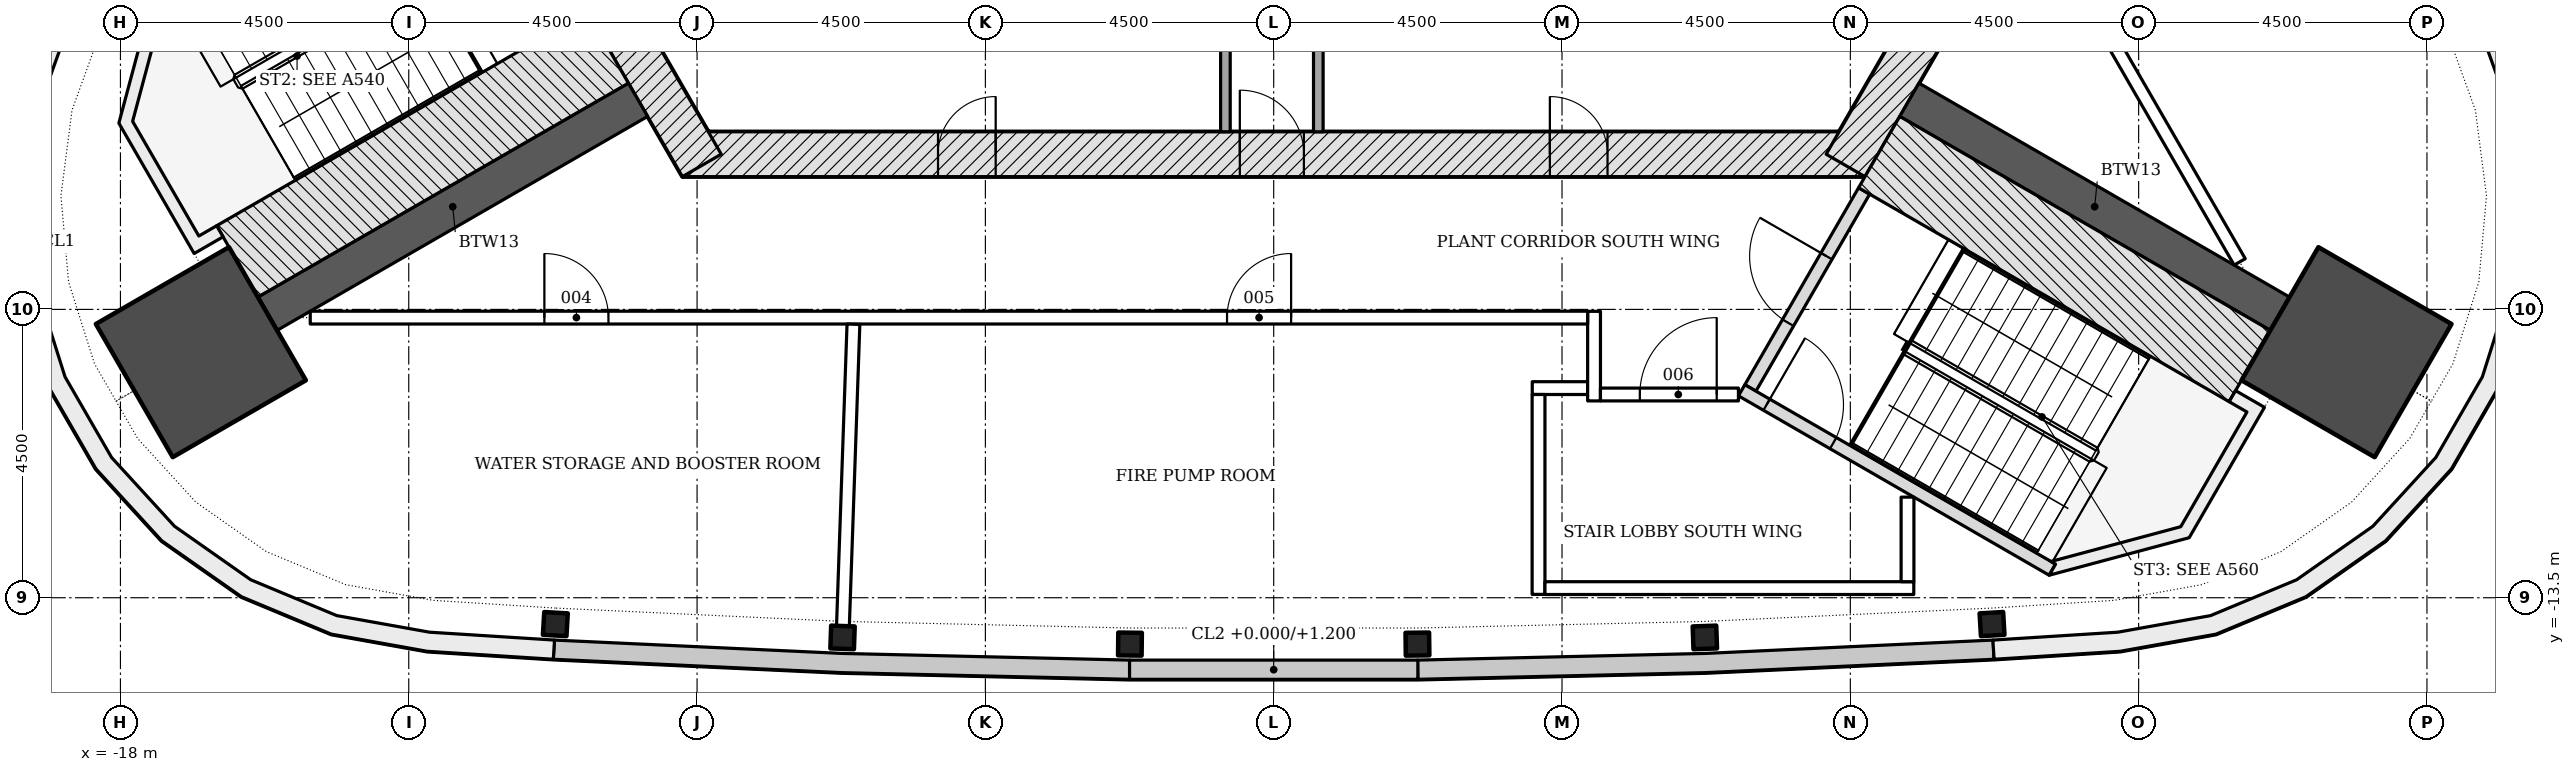
"""IFC4 building model, lengths in metres.
Left out: names, types, materials, properties, quantities, classifications, styles, units other than length and angle.
Written with IfcOpenShell. Run it as: python <this file> out.ifc"""

import sys

from ifc_helpers import new_model, si_unit, direction, frame, frame_2d, origin, origin_2d, place, context, subcontext, project, spatial, polyline, rectangle, i_section, outline, extrude, element, fill, save


model = new_model("IFC4")
c1 = context("Model", 3, precision=1e-05, world=origin(), true_north=direction((0.0, 1.0)))
c2 = subcontext(c1, "Body", "Model", "MODEL_VIEW")
j1 = project(units=[si_unit("LENGTHUNIT", "METRE"), si_unit("PLANEANGLEUNIT", "RADIAN")], contexts=[c1])
p1 = place(None, origin())
s1 = spatial("IfcSite", under=j1, at=p1, CompositionType="ELEMENT")
p2 = place(p1, origin())
s2 = spatial("IfcBuilding", under=s1, at=p2, CompositionType="ELEMENT")
p3 = place(p2, frame((0.0, 0.0, 297.6)))
s3 = spatial("IfcBuildingStorey", under=s2, at=p3, CompositionType="ELEMENT", Elevation=297.6)
p4 = place(p3, frame((-9.229, -6.578, -0.25), z_axis=(0.0, 0.0, 1.0), x_axis=(1.0, 0.0, 0.0)))
e1 = element("IfcWall", 1, at=p4, inside=s3, PredefinedType="SHEAR", context=c2, shape_type="SweptSolid", body=[
    extrude(rectangle(XDim=18.458, YDim=0.7, at=frame_2d((9.229, 0.0))), origin(), (0.0, 0.0, 1.0), 4.5),
])
p5 = place(p4, frame((8.7, 0.0, 0.25)))
e2 = element("IfcOpeningElement", 2, at=p5, cuts=e1, PredefinedType="OPENING", context=c2, shape_type="SweptSolid", body=[
    extrude(rectangle(XDim=1.0, YDim=2.1, at=frame_2d((0.5, 1.05))), frame((0.0, 0.36, 0.0), z_axis=(0.0, -1.0, 0.0), x_axis=(1.0, 0.0, 0.0)), (0.0, 0.0, 1.0), 0.72),
])
p6 = place(p4, frame((3.99, 0.0, 0.25)))
e3 = element("IfcOpeningElement", 3, at=p6, cuts=e1, PredefinedType="OPENING", context=c2, shape_type="SweptSolid", body=[
    extrude(rectangle(XDim=0.9, YDim=2.1, at=frame_2d((0.45, 1.05))), frame((0.0, 0.36, 0.0), z_axis=(0.0, -1.0, 0.0), x_axis=(1.0, 0.0, 0.0)), (0.0, 0.0, 1.0), 0.72),
])
p7 = place(p4, frame((13.539, 0.0, 0.25)))
e4 = element("IfcOpeningElement", 4, at=p7, cuts=e1, PredefinedType="OPENING", context=c2, shape_type="SweptSolid", body=[
    extrude(rectangle(XDim=0.9, YDim=2.1, at=frame_2d((0.45, 1.05))), frame((0.0, 0.36, 0.0), z_axis=(0.0, -1.0, 0.0), x_axis=(1.0, 0.0, 0.0)), (0.0, 0.0, 1.0), 0.72),
])
for number, where, z_axis, x_axis in (
    (5, (8.926, -6.753, -0.25), (0.0, 0.0, 1.0), (0.5, 0.866, 0.0)),
    (6, (-10.311, -4.353, -0.25), (0.0, 0.0, 1.0), (0.5, -0.866, 0.0)),
):
    element("IfcWall", number, at=place(p3, frame(where, z_axis=z_axis, x_axis=x_axis)), inside=s3, PredefinedType="SHEAR", context=c2, shape_type="SweptSolid", body=[
        extrude(rectangle(XDim=2.771, YDim=0.7, at=frame_2d((1.386, 0.0))), origin(), (0.0, 0.0, 1.0), 4.5),
    ])
for number, where, z_axis, x_axis in (
    (7, (-9.922, -5.728, -0.25), (0.0, 0.0, 1.0), (-0.866, -0.5, 0.0)),
    (8, (9.922, -5.728, -0.25), (0.0, 0.0, 1.0), (0.866, -0.5, 0.0)),
):
    element("IfcWall", number, at=place(p3, frame(where, z_axis=z_axis, x_axis=x_axis)), inside=s3, PredefinedType="SHEAR", context=c2, shape_type="SweptSolid", body=[
        extrude(rectangle(XDim=6.678, YDim=0.6, at=frame_2d((3.339, 0.0))), origin(), (0.0, 0.0, 1.0), 4.5),
    ])
for number, where, z_axis, x_axis in (
    (9, (-16.745, -9.667, -0.25), (0.0, 0.0, 1.0), (-0.866, -0.5, 0.0)),
    (10, (16.745, -9.667, -0.25), (0.0, 0.0, 1.0), (0.866, -0.5, 0.0)),
):
    element("IfcColumn", number, at=place(p3, frame(where, z_axis=z_axis, x_axis=x_axis)), inside=s3, PredefinedType="COLUMN", context=c2, shape_type="SweptSolid", body=[
        extrude(rectangle(XDim=2.4, YDim=2.4, at=origin_2d()), origin(), (0.0, 0.0, 1.0), 4.5),
    ])
for number, where, z_axis, x_axis in (
    (11, (-11.212, -13.911, -0.25), (0.0, 0.0, 1.0), (0.998, -0.058, 0.0)),
    (12, (-6.729, -14.119, -0.25), (0.0, 0.0, 1.0), (0.999, -0.035, 0.0)),
    (13, (-2.244, -14.224, -0.25), (0.0, 0.0, 1.0), (1.0, -0.012, 0.0)),
    (14, (2.244, -14.224, -0.25), (0.0, 0.0, 1.0), (1.0, 0.012, 0.0)),
    (15, (6.729, -14.119, -0.25), (0.0, 0.0, 1.0), (0.999, 0.035, 0.0)),
    (16, (11.212, -13.911, -0.25), (0.0, 0.0, 1.0), (0.998, 0.058, 0.0)),
):
    element("IfcColumn", number, at=place(p3, frame(where, z_axis=z_axis, x_axis=x_axis)), inside=s3, PredefinedType="COLUMN", context=c2, shape_type="SweptSolid", body=[
        extrude(i_section(OverallWidth=0.368, OverallDepth=0.356, WebThickness=0.011, FlangeThickness=0.018, FilletRadius=0.015, at=origin_2d()), origin(), (0.0, 0.0, 1.0), 4.5),
    ])
p8 = place(p3, origin())
e17 = element("IfcWall", 17, at=p8, inside=s3, PredefinedType="NOTDEFINED", context=c2, shape_type="SweptSolid", body=[
    extrude(outline(polyline([(-11.244, -14.46), (-6.749, -14.669), (-2.25, -14.773), (-2.243, -14.474), (-6.738, -14.369), (-11.23, -14.161), (-11.244, -14.46)])), origin(), (0.0, 0.0, 1.0), 4.25),
])
p9 = place(p3, origin())
e18 = element("IfcWall", 18, at=p9, inside=s3, PredefinedType="NOTDEFINED", context=c2, shape_type="SweptSolid", body=[
    extrude(outline(polyline([(2.25, -14.773), (6.749, -14.669), (11.244, -14.46), (11.23, -14.161), (6.738, -14.369), (2.243, -14.474), (2.25, -14.773)])), origin(), (0.0, 0.0, 1.0), 4.25),
])
p10 = place(p3, origin())
e19 = element("IfcWall", 19, at=p10, inside=s3, PredefinedType="NOTDEFINED", context=c2, shape_type="SweptSolid", body=[
    extrude(outline(polyline([(-2.25, -14.773), (2.25, -14.773), (2.25, -14.473), (-2.25, -14.473), (-2.25, -14.773)])), origin(), (0.0, 0.0, 1.0), 1.2),
])
p11 = place(p3, origin())
e20 = element("IfcWall", 20, at=p11, inside=s3, PredefinedType="NOTDEFINED", context=c2, shape_type="SweptSolid", body=[
    extrude(outline(polyline([(-18.145, -2.507), (-19.021, -4.273), (-19.538, -5.703), (-19.733, -7.21), (-19.599, -8.724), (-19.141, -10.174), (-18.381, -11.49), (-17.355, -12.611), (-16.111, -13.485), (-14.708, -14.069), (-13.211, -14.336), (-11.244, -14.46), (-11.225, -14.161), (-13.176, -14.038), (-14.623, -13.779), (-15.965, -13.22), (-17.156, -12.385), (-18.138, -11.312), (-18.865, -10.052), (-19.303, -8.665), (-19.432, -7.216), (-19.244, -5.774), (-18.745, -4.391), (-17.876, -2.64), (-18.145, -2.507)])), origin(), (0.0, 0.0, 1.0), 4.25),
])
p12 = place(p3, origin())
e21 = element("IfcWall", 21, at=p12, inside=s3, PredefinedType="NOTDEFINED", context=c2, shape_type="SweptSolid", body=[
    extrude(outline(polyline([(11.244, -14.46), (13.211, -14.336), (14.708, -14.069), (16.111, -13.485), (17.355, -12.611), (18.381, -11.49), (19.141, -10.174), (19.599, -8.724), (19.733, -7.21), (19.538, -5.703), (19.021, -4.273), (18.145, -2.507), (17.876, -2.64), (18.745, -4.391), (19.244, -5.774), (19.432, -7.216), (19.303, -8.665), (18.865, -10.052), (18.138, -11.312), (17.156, -12.385), (15.965, -13.22), (14.623, -13.779), (13.176, -14.038), (11.225, -14.161), (11.244, -14.46)])), origin(), (0.0, 0.0, 1.0), 4.25),
])
p13 = place(p3, frame((-0.754, 10.756, 0.0), z_axis=(0.0, 0.0, 1.0), x_axis=(0.0, -1.0, 0.0)))
e22 = element("IfcWall", 22, at=p13, inside=s3, PredefinedType="PARTITIONING", context=c2, shape_type="SweptSolid", body=[
    extrude(rectangle(XDim=16.985, YDim=0.15, at=frame_2d((8.492, 0.0))), origin(), (0.0, 0.0, 1.0), 4.25),
])
p14 = place(p13, frame((9.185, 0.0, 0.0)))
e23 = element("IfcOpeningElement", 23, at=p14, cuts=e22, PredefinedType="OPENING", context=c2, shape_type="SweptSolid", body=[
    extrude(rectangle(XDim=0.9, YDim=2.1, at=frame_2d((0.45, 1.05))), frame((0.0, 0.085, 0.0), z_axis=(0.0, -1.0, 0.0), x_axis=(1.0, 0.0, 0.0)), (0.0, 0.0, 1.0), 0.17),
])
p15 = place(p3, frame((0.696, 5.197, 0.0), z_axis=(0.0, 0.0, 1.0), x_axis=(0.0, -1.0, 0.0)))
e24 = element("IfcWall", 24, at=p15, inside=s3, PredefinedType="PARTITIONING", context=c2, shape_type="SweptSolid", body=[
    extrude(rectangle(XDim=11.425, YDim=0.15, at=frame_2d((5.712, 0.0))), origin(), (0.0, 0.0, 1.0), 4.25),
])
p16 = place(p15, frame((3.664, 0.0, 0.0)))
e25 = element("IfcOpeningElement", 25, at=p16, cuts=e24, PredefinedType="OPENING", context=c2, shape_type="SweptSolid", body=[
    extrude(rectangle(XDim=0.9, YDim=2.1, at=frame_2d((0.45, 1.05))), frame((0.0, 0.085, 0.0), z_axis=(0.0, -1.0, 0.0), x_axis=(1.0, 0.0, 0.0)), (0.0, 0.0, 1.0), 0.17),
])
p17 = place(p3, frame((-10.393, -4.912, -0.25), z_axis=(0.0, 0.0, 1.0), x_axis=(-0.866025486527, -0.499999856685, 0.0)))
e26 = element("IfcWall", 26, at=p17, inside=s3, PredefinedType="SHEAR", context=c2, shape_type="SweptSolid", body=[
    extrude(rectangle(XDim=6.679, YDim=1.286, at=frame_2d((3.339, 0.0))), origin(), (0.0, 0.0, 1.0), 4.5),
])
p18 = place(p3, frame((0.0, 0.0, -0.25)))
e27 = element("IfcWall", 27, at=p18, inside=s3, PredefinedType="SHEAR", context=c2, shape_type="SweptSolid", body=[
    extrude(outline(polyline([(-17.439, -3.907), (-18.025, -6.093), (-16.85, -8.128), (-16.398, -7.867), (-16.498, -7.694), (-16.498, -7.694), (-16.777, -7.855), (-17.81, -6.065), (-17.267, -4.039), (-17.339, -4.081), (-17.339, -4.081), (-17.339, -4.081), (-17.339, -4.081), (-17.339, -4.081), (-17.339, -4.081), (-17.339, -4.081), (-17.339, -4.081), (-17.339, -4.081), (-17.339, -4.081), (-17.339, -4.081), (-17.339, -4.081), (-17.339, -4.081), (-17.339, -4.081), (-17.339, -4.081), (-17.339, -4.081), (-17.339, -4.081), (-17.439, -3.907)])), origin(), (0.0, 0.0, 1.0), 4.5),
])
p19 = place(p3, frame((7.44, -10.226, -0.25), z_axis=(0.0, 0.0, 1.0), x_axis=(0.500022077904, 0.866012656725, 0.0)))
e28 = element("IfcWall", 28, at=p19, inside=s3, PredefinedType="SHEAR", context=c2, shape_type="SweptSolid", body=[
    extrude(rectangle(XDim=3.55, YDim=0.2, at=frame_2d((1.775, 0.0))), origin(), (0.0, 0.0, 1.0), 4.5),
])
p20 = place(p19, frame((1.175, 0.0, 0.25)))
e29 = element("IfcOpeningElement", 29, at=p20, cuts=e28, PredefinedType="OPENING", context=c2, shape_type="SweptSolid", body=[
    extrude(rectangle(XDim=1.2, YDim=2.1, at=frame_2d((0.6, 1.05))), frame((0.0, 0.11, 0.0), z_axis=(0.0, -1.0, 0.0), x_axis=(1.0, 0.0, 0.0)), (0.0, 0.0, 1.0), 0.22),
])
p21 = place(p3, frame((7.304, -10.262, -0.25), z_axis=(0.0, 0.0, 1.0), x_axis=(0.866026594901, -0.49999793692, 0.0)))
e30 = element("IfcWall", 30, at=p21, inside=s3, PredefinedType="SHEAR", context=c2, shape_type="SweptSolid", body=[
    extrude(rectangle(XDim=5.6, YDim=0.2, at=frame_2d((2.8, 0.0))), origin(), (0.0, 0.0, 1.0), 4.5),
])
p22 = place(p21, frame((0.45, 0.0, 0.25)))
e31 = element("IfcOpeningElement", 31, at=p22, cuts=e30, PredefinedType="OPENING", context=c2, shape_type="SweptSolid", body=[
    extrude(rectangle(XDim=1.2, YDim=2.1, at=frame_2d((0.6, 1.05))), frame((0.0, 0.11, 0.0), z_axis=(0.0, -1.0, 0.0), x_axis=(1.0, 0.0, 0.0)), (0.0, 0.0, 1.0), 0.22),
])
p23 = place(p3, frame((9.45, -6.545, -0.25), z_axis=(0.0, 0.0, 1.0), x_axis=(0.866016347338, -0.500015685897, 0.0)))
e32 = element("IfcWall", 32, at=p23, inside=s3, PredefinedType="SHEAR", context=c2, shape_type="SweptSolid", body=[
    extrude(rectangle(XDim=6.678, YDim=1.286, at=frame_2d((3.339, 0.0))), origin(), (0.0, 0.0, 1.0), 4.5),
])
p24 = place(p3, frame((0.0, 0.0, -0.25)))
e33 = element("IfcWall", 33, at=p24, inside=s3, PredefinedType="SHEAR", context=c2, shape_type="SweptSolid", body=[
    extrude(outline(polyline([(12.104, -13.149), (14.289, -12.563), (15.464, -10.528), (15.013, -10.268), (14.913, -10.441), (15.191, -10.601), (14.157, -12.392), (12.132, -12.934), (12.204, -12.976), (12.204, -12.976), (12.204, -12.976), (12.204, -12.976), (12.204, -12.976), (12.204, -12.976), (12.204, -12.976), (12.204, -12.976), (12.204, -12.976), (12.204, -12.976), (12.204, -12.976), (12.204, -12.976), (12.204, -12.976), (12.204, -12.976), (12.204, -12.976), (12.204, -12.976), (12.204, -12.976), (12.104, -13.149)])), origin(), (0.0, 0.0, 1.0), 4.5),
])
p25 = place(p3, frame((4.036, -10.228, 0.0), z_axis=(0.0, 0.0, 1.0), x_axis=(1.0, 0.0, 0.0)))
e34 = element("IfcWall", 34, at=p25, inside=s3, PredefinedType="PARTITIONING", context=c2, shape_type="SweptSolid", body=[
    extrude(rectangle(XDim=0.864, YDim=0.2, at=frame_2d((0.432, 0.0))), origin(), (0.0, 0.0, 1.0), 4.25),
])
p26 = place(p3, frame((5.0, -10.428, 0.0), z_axis=(0.0, 0.0, 1.0), x_axis=(0.0, 1.0, 0.0)))
e35 = element("IfcWall", 35, at=p26, inside=s3, PredefinedType="PARTITIONING", context=c2, shape_type="SweptSolid", body=[
    extrude(rectangle(XDim=1.398, YDim=0.2, at=frame_2d((0.699, 0.0))), origin(), (0.0, 0.0, 1.0), 4.25),
])
p27 = place(p3, frame((5.1, -10.328, 0.0), z_axis=(0.0, 0.0, 1.0), x_axis=(1.0, 0.0, 0.0)))
e36 = element("IfcWall", 36, at=p27, inside=s3, PredefinedType="PARTITIONING", context=c2, shape_type="SweptSolid", body=[
    extrude(rectangle(XDim=2.154, YDim=0.2, at=frame_2d((1.077, 0.0))), origin(), (0.0, 0.0, 1.0), 3.702),
])
p28 = place(p27, frame((0.615, 0.0, 0.0)))
e37 = element("IfcOpeningElement", 37, at=p28, cuts=e36, PredefinedType="OPENING", context=c2, shape_type="SweptSolid", body=[
    extrude(rectangle(XDim=1.2, YDim=2.1, at=frame_2d((0.6, 1.05))), frame((0.0, 0.11, 0.0), z_axis=(0.0, -1.0, 0.0), x_axis=(1.0, 0.0, 0.0)), (0.0, 0.0, 1.0), 0.22),
])
p29 = place(p3, frame((-15.037, -9.128, 0.0), z_axis=(0.0, 0.0, 1.0), x_axis=(1.0, 0.0, 0.0)))
e38 = element("IfcWall", 38, at=p29, inside=s3, PredefinedType="PARTITIONING", context=c2, shape_type="SweptSolid", body=[
    extrude(rectangle(XDim=19.937, YDim=0.2, at=frame_2d((9.969, 0.0))), origin(), (0.0, 0.0, 1.0), 3.702),
])
p30 = place(p29, frame((3.654, 0.0, 0.0)))
e39 = element("IfcOpeningElement", 39, at=p30, cuts=e38, PredefinedType="OPENING", context=c2, shape_type="SweptSolid", body=[
    extrude(rectangle(XDim=1.0, YDim=2.1, at=frame_2d((0.5, 1.05))), frame((0.0, 0.11, 0.0), z_axis=(0.0, -1.0, 0.0), x_axis=(1.0, 0.0, 0.0)), (0.0, 0.0, 1.0), 0.22),
])
p31 = place(p29, frame((14.309, 0.0, 0.0)))
e40 = element("IfcOpeningElement", 40, at=p31, cuts=e38, PredefinedType="OPENING", context=c2, shape_type="SweptSolid", body=[
    extrude(rectangle(XDim=1.0, YDim=2.1, at=frame_2d((0.5, 1.05))), frame((0.0, 0.11, 0.0), z_axis=(0.0, -1.0, 0.0), x_axis=(1.0, 0.0, 0.0)), (0.0, 0.0, 1.0), 0.22),
])
p32 = place(p3, frame((-6.724, -13.969, 0.0), z_axis=(0.0, 0.0, 1.0), x_axis=(0.034813471468, 0.99939382738, 0.0)))
e41 = element("IfcWall", 41, at=p32, inside=s3, PredefinedType="PARTITIONING", context=c2, shape_type="SweptSolid", body=[
    extrude(rectangle(XDim=4.741, YDim=0.2, at=frame_2d((2.37, 0.0))), origin(), (0.0, 0.0, 1.0), 3.702),
])
p33 = place(p3, frame((4.134, -10.328, 0.0), z_axis=(0.0, 0.0, 1.0), x_axis=(0.0, -1.0, 0.0)))
e42 = element("IfcWall", 42, at=p33, inside=s3, PredefinedType="PARTITIONING", context=c2, shape_type="SweptSolid", body=[
    extrude(rectangle(XDim=3.12, YDim=0.2, at=frame_2d((1.56, 0.0))), origin(), (0.0, 0.0, 1.0), 4.25),
])
p34 = place(p3, frame((4.234, -13.35, 0.0), z_axis=(0.0, 0.0, 1.0), x_axis=(1.0, 0.0, 0.0)))
e43 = element("IfcWall", 43, at=p34, inside=s3, PredefinedType="PARTITIONING", context=c2, shape_type="SweptSolid", body=[
    extrude(rectangle(XDim=5.757, YDim=0.2, at=frame_2d((2.878, 0.0))), origin(), (0.0, 0.0, 1.0), 3.702),
])
p35 = place(p3, frame((9.893, -13.25, 0.0), z_axis=(0.0, 0.0, 1.0), x_axis=(0.0, 1.0, 0.0)))
e44 = element("IfcWall", 44, at=p35, inside=s3, PredefinedType="PARTITIONING", context=c2, shape_type="SweptSolid", body=[
    extrude(rectangle(XDim=1.32, YDim=0.2, at=frame_2d((0.66, 0.0))), origin(), (0.0, 0.0, 1.0), 4.25),
])
p36 = place(p3, frame((5.282, 8.708, 0.0), z_axis=(0.0, 0.0, 1.0), x_axis=(0.500001848211, -0.866024336717, 0.0)))
e45 = element("IfcWall", 45, at=p36, inside=s3, PredefinedType="PARTITIONING", context=c2, shape_type="SweptSolid", body=[
    extrude(rectangle(XDim=19.591, YDim=0.2, at=frame_2d((9.795, 0.0))), origin(), (0.0, 0.0, 1.0), 3.702),
])
p37 = place(p36, frame((12.923, 0.0, 0.0)))
e46 = element("IfcOpeningElement", 46, at=p37, cuts=e45, PredefinedType="OPENING", context=c2, shape_type="SweptSolid", body=[
    extrude(rectangle(XDim=1.0, YDim=2.1, at=frame_2d((0.5, 1.05))), frame((0.0, 0.11, 0.0), z_axis=(0.0, -1.0, 0.0), x_axis=(1.0, 0.0, 0.0)), (0.0, 0.0, 1.0), 0.22),
])
p38 = place(p36, frame((2.444, 0.0, 0.0)))
e47 = element("IfcOpeningElement", 47, at=p38, cuts=e45, PredefinedType="OPENING", context=c2, shape_type="SweptSolid", body=[
    extrude(rectangle(XDim=1.0, YDim=2.1, at=frame_2d((0.5, 1.05))), frame((0.0, 0.11, 0.0), z_axis=(0.0, -1.0, 0.0), x_axis=(1.0, 0.0, 0.0)), (0.0, 0.0, 1.0), 0.22),
])
p39 = place(p5, origin())
e48 = element("IfcDoor", 48, at=p39, inside=s3, OperationType="SINGLE_SWING_LEFT", PredefinedType="DOOR", context=c2, shape_type="SweptSolid", body=[
    extrude(rectangle(XDim=1.0, YDim=2.1, at=frame_2d((0.5, 1.05))), frame((0.0, 0.075, 0.0), z_axis=(0.0, -1.0, 0.0), x_axis=(1.0, 0.0, 0.0)), (0.0, 0.0, 1.0), 0.15),
])
fill(e2, e48)
p40 = place(p6, origin())
e49 = element("IfcDoor", 49, at=p40, inside=s3, OperationType="SINGLE_SWING_RIGHT", PredefinedType="DOOR", context=c2, shape_type="SweptSolid", body=[
    extrude(rectangle(XDim=0.9, YDim=2.1, at=frame_2d((0.45, 1.05))), frame((0.0, 0.075, 0.0), z_axis=(0.0, -1.0, 0.0), x_axis=(1.0, 0.0, 0.0)), (0.0, 0.0, 1.0), 0.15),
])
fill(e3, e49)
p41 = place(p7, origin())
e50 = element("IfcDoor", 50, at=p41, inside=s3, OperationType="SINGLE_SWING_LEFT", PredefinedType="DOOR", context=c2, shape_type="SweptSolid", body=[
    extrude(rectangle(XDim=0.9, YDim=2.1, at=frame_2d((0.45, 1.05))), frame((0.0, 0.075, 0.0), z_axis=(0.0, -1.0, 0.0), x_axis=(1.0, 0.0, 0.0)), (0.0, 0.0, 1.0), 0.15),
])
fill(e4, e50)
p42 = place(p20, origin())
e51 = element("IfcDoor", 51, at=p42, inside=s3, OperationType="SINGLE_SWING_RIGHT", PredefinedType="DOOR", context=c2, shape_type="SweptSolid", body=[
    extrude(rectangle(XDim=1.2, YDim=2.1, at=frame_2d((0.6, 1.05))), frame((0.0, 0.025, 0.0), z_axis=(0.0, -1.0, 0.0), x_axis=(1.0, 0.0, 0.0)), (0.0, 0.0, 1.0), 0.05),
])
fill(e29, e51)
p43 = place(p22, origin())
e52 = element("IfcDoor", 52, at=p43, inside=s3, OperationType="SINGLE_SWING_LEFT", PredefinedType="DOOR", context=c2, shape_type="SweptSolid", body=[
    extrude(rectangle(XDim=1.2, YDim=2.1, at=frame_2d((0.6, 1.05))), frame((0.0, 0.025, 0.0), z_axis=(0.0, -1.0, 0.0), x_axis=(1.0, 0.0, 0.0)), (0.0, 0.0, 1.0), 0.05),
])
fill(e31, e52)
p44 = place(p30, origin())
e53 = element("IfcDoor", 53, at=p44, inside=s3, OperationType="SINGLE_SWING_LEFT", PredefinedType="DOOR", context=c2, shape_type="SweptSolid", body=[
    extrude(rectangle(XDim=1.0, YDim=2.1, at=frame_2d((0.5, 1.05))), frame((0.0, 0.025, 0.0), z_axis=(0.0, -1.0, 0.0), x_axis=(1.0, 0.0, 0.0)), (0.0, 0.0, 1.0), 0.05),
])
fill(e39, e53)
p45 = place(p31, origin())
e54 = element("IfcDoor", 54, at=p45, inside=s3, OperationType="SINGLE_SWING_RIGHT", PredefinedType="DOOR", context=c2, shape_type="SweptSolid", body=[
    extrude(rectangle(XDim=1.0, YDim=2.1, at=frame_2d((0.5, 1.05))), frame((0.0, 0.025, 0.0), z_axis=(0.0, -1.0, 0.0), x_axis=(1.0, 0.0, 0.0)), (0.0, 0.0, 1.0), 0.05),
])
fill(e40, e54)
p46 = place(p28, origin())
e55 = element("IfcDoor", 55, at=p46, inside=s3, OperationType="SINGLE_SWING_RIGHT", PredefinedType="DOOR", context=c2, shape_type="SweptSolid", body=[
    extrude(rectangle(XDim=1.2, YDim=2.1, at=frame_2d((0.6, 1.05))), frame((0.0, 0.025, 0.0), z_axis=(0.0, -1.0, 0.0), x_axis=(1.0, 0.0, 0.0)), (0.0, 0.0, 1.0), 0.05),
])
fill(e37, e55)
save(model, sys.argv[1])
